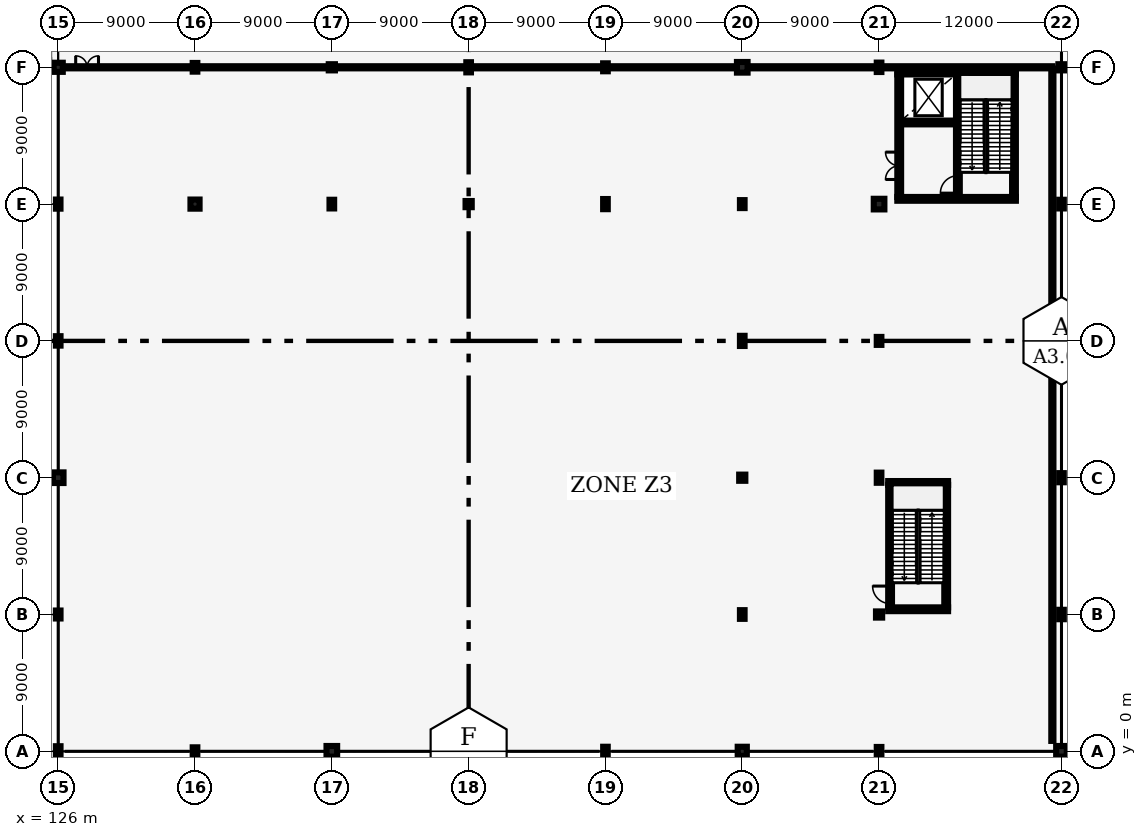
"""IFC4 building model, lengths in metres.
Left out: names, types, materials, properties, quantities, classifications, styles, units other than length and angle.
Written with IfcOpenShell. Run it as: python <this file> out.ifc"""

import sys

from ifc_helpers import new_model, si_unit, direction, frame, frame_2d, origin, origin_2d, place, context, subcontext, project, spatial, rectangle, hollow_circle, i_section, extrude, element, fill, save


model = new_model("IFC4")
c1 = context("Model", 3, precision=1e-05, world=origin(), true_north=direction((0.0, 1.0)))
c2 = subcontext(c1, "Body", "Model", "MODEL_VIEW")
j1 = project(units=[si_unit("LENGTHUNIT", "METRE"), si_unit("PLANEANGLEUNIT", "RADIAN")], contexts=[c1])
p1 = place(None, origin())
s1 = spatial("IfcSite", under=j1, at=p1, CompositionType="ELEMENT")
p2 = place(p1, origin())
s2 = spatial("IfcBuilding", under=s1, at=p2, CompositionType="ELEMENT")
p3 = place(p2, frame((0.0, 0.0, 12.0)))
s3 = spatial("IfcBuildingStorey", under=s2, at=p3, CompositionType="ELEMENT", Elevation=12.0)
p4 = place(p3, frame((126.0, 0.0, 0.0), z_axis=(0.0, 0.0, 1.0), x_axis=(1.0, 0.0, 0.0)))
e1 = element("IfcColumn", 1, at=p4, inside=s3, PredefinedType="COLUMN", context=c2, shape_type="SweptSolid", body=[
    extrude(i_section(OverallWidth=0.305, OverallDepth=0.668, WebThickness=0.021, FlangeThickness=0.04, FilletRadius=0.027, at=origin_2d()), origin(), (0.0, 0.0, 1.0), 6.0),
])
p5 = place(p3, frame((126.0, 9.0, 0.0), z_axis=(0.0, 0.0, 1.0), x_axis=(1.0, 0.0, 0.0)))
e2 = element("IfcColumn", 2, at=p5, inside=s3, PredefinedType="COLUMN", context=c2, shape_type="SweptSolid", body=[
    extrude(i_section(OverallWidth=0.306, OverallDepth=0.524, WebThickness=0.021, FlangeThickness=0.04, FilletRadius=0.027, at=origin_2d()), origin(), (0.0, 0.0, 1.0), 6.0),
])
p6 = place(p3, frame((126.0, 18.0, 0.0), z_axis=(0.0, 0.0, 1.0), x_axis=(1.0, 0.0, 0.0)))
e3 = element("IfcColumn", 3, at=p6, inside=s3, PredefinedType="COLUMN", context=c2, shape_type="SweptSolid", body=[
    extrude(rectangle(XDim=0.7, YDim=0.7, at=origin_2d()), origin(), (0.0, 0.0, 1.0), 6.0),
])
p7 = place(p3, frame((126.0, 27.0, 0.0), z_axis=(0.0, 0.0, 1.0), x_axis=(1.0, 0.0, 0.0)))
e4 = element("IfcColumn", 4, at=p7, inside=s3, PredefinedType="COLUMN", context=c2, shape_type="SweptSolid", body=[
    extrude(i_section(OverallWidth=0.305, OverallDepth=0.62, WebThickness=0.021, FlangeThickness=0.04, FilletRadius=0.027, at=origin_2d()), origin(), (0.0, 0.0, 1.0), 6.0),
])
p8 = place(p3, frame((126.0, 36.0, 0.0), z_axis=(0.0, 0.0, 1.0), x_axis=(1.0, 0.0, 0.0)))
e5 = element("IfcColumn", 5, at=p8, inside=s3, PredefinedType="COLUMN", context=c2, shape_type="SweptSolid", body=[
    extrude(i_section(OverallWidth=0.3, OverallDepth=0.6, WebThickness=0.015, FlangeThickness=0.03, FilletRadius=0.027, at=origin_2d()), origin(), (0.0, 0.0, 1.0), 6.0),
])
p9 = place(p3, frame((126.0, 45.0, 0.0), z_axis=(0.0, 0.0, 1.0), x_axis=(1.0, 0.0, 0.0)))
e6 = element("IfcColumn", 6, at=p9, inside=s3, PredefinedType="COLUMN", context=c2, shape_type="SweptSolid", body=[
    extrude(rectangle(XDim=0.6, YDim=0.6, at=origin_2d()), origin(), (0.0, 0.0, 1.0), 6.0),
])
p10 = place(p3, frame((135.0, 0.0, 0.0), z_axis=(0.0, 0.0, 1.0), x_axis=(1.0, 0.0, 0.0)))
e7 = element("IfcColumn", 7, at=p10, inside=s3, PredefinedType="COLUMN", context=c2, shape_type="SweptSolid", body=[
    extrude(i_section(OverallWidth=0.306, OverallDepth=0.524, WebThickness=0.021, FlangeThickness=0.04, FilletRadius=0.027, at=origin_2d()), origin(), (0.0, 0.0, 1.0), 6.0),
])
p11 = place(p3, frame((135.0, 36.0, 0.0), z_axis=(0.0, 0.0, 1.0), x_axis=(1.0, 0.0, 0.0)))
e8 = element("IfcColumn", 8, at=p11, inside=s3, PredefinedType="COLUMN", context=c2, shape_type="SweptSolid", body=[
    extrude(rectangle(XDim=0.6, YDim=0.6, at=origin_2d()), origin(), (0.0, 0.0, 1.0), 6.0),
])
p12 = place(p3, frame((135.0, 45.0, 0.0), z_axis=(0.0, 0.0, 1.0), x_axis=(1.0, 0.0, 0.0)))
e9 = element("IfcColumn", 9, at=p12, inside=s3, PredefinedType="COLUMN", context=c2, shape_type="SweptSolid", body=[
    extrude(i_section(OverallWidth=0.306, OverallDepth=0.572, WebThickness=0.021, FlangeThickness=0.04, FilletRadius=0.027, at=origin_2d()), origin(), (0.0, 0.0, 1.0), 6.0),
])
p13 = place(p3, frame((144.0, 0.0, 0.0), z_axis=(0.0, 0.0, 1.0), x_axis=(1.0, 0.0, 0.0)))
e10 = element("IfcColumn", 10, at=p13, inside=s3, PredefinedType="COLUMN", context=c2, shape_type="SweptSolid", body=[
    extrude(rectangle(XDim=0.7, YDim=0.7, at=origin_2d()), origin(), (0.0, 0.0, 1.0), 6.0),
])
p14 = place(p3, frame((144.0, 36.0, 0.0), z_axis=(0.0, 0.0, 1.0), x_axis=(1.0, 0.0, 0.0)))
e11 = element("IfcColumn", 11, at=p14, inside=s3, PredefinedType="COLUMN", context=c2, shape_type="SweptSolid", body=[
    extrude(i_section(OverallWidth=0.306, OverallDepth=0.572, WebThickness=0.021, FlangeThickness=0.04, FilletRadius=0.027, at=origin_2d()), origin(), (0.0, 0.0, 1.0), 6.0),
])
p15 = place(p3, frame((144.0, 45.0, 0.0), z_axis=(0.0, 0.0, 1.0), x_axis=(1.0, 0.0, 0.0)))
e12 = element("IfcColumn", 12, at=p15, inside=s3, PredefinedType="COLUMN", context=c2, shape_type="SweptSolid", body=[
    extrude(hollow_circle(Radius=0.203, WallThickness=0.016, at=origin_2d()), origin(), (0.0, 0.0, 1.0), 6.0),
])
p16 = place(p3, frame((153.0, 0.0, 0.0), z_axis=(0.0, 0.0, 1.0), x_axis=(1.0, 0.0, 0.0)))
e13 = element("IfcColumn", 13, at=p16, inside=s3, PredefinedType="COLUMN", context=c2, shape_type="SweptSolid", body=[
    extrude(i_section(OverallWidth=0.305, OverallDepth=0.62, WebThickness=0.021, FlangeThickness=0.04, FilletRadius=0.027, at=origin_2d()), origin(), (0.0, 0.0, 1.0), 6.0),
])
p17 = place(p3, frame((153.0, 36.0, 0.0), z_axis=(0.0, 0.0, 1.0), x_axis=(1.0, 0.0, 0.0)))
e14 = element("IfcColumn", 14, at=p17, inside=s3, PredefinedType="COLUMN", context=c2, shape_type="SweptSolid", body=[
    extrude(hollow_circle(Radius=0.203, WallThickness=0.016, at=origin_2d()), origin(), (0.0, 0.0, 1.0), 6.0),
])
p18 = place(p3, frame((153.0, 45.0, 0.0), z_axis=(0.0, 0.0, 1.0), x_axis=(1.0, 0.0, 0.0)))
e15 = element("IfcColumn", 15, at=p18, inside=s3, PredefinedType="COLUMN", context=c2, shape_type="SweptSolid", body=[
    extrude(i_section(OverallWidth=0.305, OverallDepth=0.668, WebThickness=0.021, FlangeThickness=0.04, FilletRadius=0.027, at=origin_2d()), origin(), (0.0, 0.0, 1.0), 6.0),
])
p19 = place(p3, frame((162.0, 0.0, 0.0), z_axis=(0.0, 0.0, 1.0), x_axis=(1.0, 0.0, 0.0)))
e16 = element("IfcColumn", 16, at=p19, inside=s3, PredefinedType="COLUMN", context=c2, shape_type="SweptSolid", body=[
    extrude(i_section(OverallWidth=0.3, OverallDepth=0.6, WebThickness=0.015, FlangeThickness=0.03, FilletRadius=0.027, at=origin_2d()), origin(), (0.0, 0.0, 1.0), 6.0),
])
p20 = place(p3, frame((162.0, 36.0, 0.0), z_axis=(0.0, 0.0, 1.0), x_axis=(1.0, 0.0, 0.0)))
e17 = element("IfcColumn", 17, at=p20, inside=s3, PredefinedType="COLUMN", context=c2, shape_type="SweptSolid", body=[
    extrude(i_section(OverallWidth=0.305, OverallDepth=0.668, WebThickness=0.021, FlangeThickness=0.04, FilletRadius=0.027, at=origin_2d()), origin(), (0.0, 0.0, 1.0), 6.0),
])
p21 = place(p3, frame((162.0, 45.0, 0.0), z_axis=(0.0, 0.0, 1.0), x_axis=(1.0, 0.0, 0.0)))
e18 = element("IfcColumn", 18, at=p21, inside=s3, PredefinedType="COLUMN", context=c2, shape_type="SweptSolid", body=[
    extrude(i_section(OverallWidth=0.306, OverallDepth=0.524, WebThickness=0.021, FlangeThickness=0.04, FilletRadius=0.027, at=origin_2d()), origin(), (0.0, 0.0, 1.0), 6.0),
])
p22 = place(p3, frame((171.0, 0.0, 0.0), z_axis=(0.0, 0.0, 1.0), x_axis=(1.0, 0.0, 0.0)))
e19 = element("IfcColumn", 19, at=p22, inside=s3, PredefinedType="COLUMN", context=c2, shape_type="SweptSolid", body=[
    extrude(rectangle(XDim=0.6, YDim=0.6, at=origin_2d()), origin(), (0.0, 0.0, 1.0), 6.0),
])
p23 = place(p3, frame((171.0, 9.0, 0.0), z_axis=(0.0, 0.0, 1.0), x_axis=(1.0, 0.0, 0.0)))
e20 = element("IfcColumn", 20, at=p23, inside=s3, PredefinedType="COLUMN", context=c2, shape_type="SweptSolid", body=[
    extrude(i_section(OverallWidth=0.306, OverallDepth=0.572, WebThickness=0.021, FlangeThickness=0.04, FilletRadius=0.027, at=origin_2d()), origin(), (0.0, 0.0, 1.0), 6.0),
])
p24 = place(p3, frame((171.0, 18.0, 0.0), z_axis=(0.0, 0.0, 1.0), x_axis=(1.0, 0.0, 0.0)))
e21 = element("IfcColumn", 21, at=p24, inside=s3, PredefinedType="COLUMN", context=c2, shape_type="SweptSolid", body=[
    extrude(hollow_circle(Radius=0.203, WallThickness=0.016, at=origin_2d()), origin(), (0.0, 0.0, 1.0), 6.0),
])
p25 = place(p3, frame((171.0, 27.0, 0.0), z_axis=(0.0, 0.0, 1.0), x_axis=(1.0, 0.0, 0.0)))
e22 = element("IfcColumn", 22, at=p25, inside=s3, PredefinedType="COLUMN", context=c2, shape_type="SweptSolid", body=[
    extrude(i_section(OverallWidth=0.305, OverallDepth=0.668, WebThickness=0.021, FlangeThickness=0.04, FilletRadius=0.027, at=origin_2d()), origin(), (0.0, 0.0, 1.0), 6.0),
])
p26 = place(p3, frame((171.0, 36.0, 0.0), z_axis=(0.0, 0.0, 1.0), x_axis=(1.0, 0.0, 0.0)))
e23 = element("IfcColumn", 23, at=p26, inside=s3, PredefinedType="COLUMN", context=c2, shape_type="SweptSolid", body=[
    extrude(i_section(OverallWidth=0.306, OverallDepth=0.524, WebThickness=0.021, FlangeThickness=0.04, FilletRadius=0.027, at=origin_2d()), origin(), (0.0, 0.0, 1.0), 6.0),
])
p27 = place(p3, frame((171.0, 45.0, 0.0), z_axis=(0.0, 0.0, 1.0), x_axis=(1.0, 0.0, 0.0)))
e24 = element("IfcColumn", 24, at=p27, inside=s3, PredefinedType="COLUMN", context=c2, shape_type="SweptSolid", body=[
    extrude(rectangle(XDim=0.7, YDim=0.7, at=origin_2d()), origin(), (0.0, 0.0, 1.0), 6.0),
])
p28 = place(p3, frame((180.0, 0.0, 0.0), z_axis=(0.0, 0.0, 1.0), x_axis=(1.0, 0.0, 0.0)))
e25 = element("IfcColumn", 25, at=p28, inside=s3, PredefinedType="COLUMN", context=c2, shape_type="SweptSolid", body=[
    extrude(i_section(OverallWidth=0.306, OverallDepth=0.572, WebThickness=0.021, FlangeThickness=0.04, FilletRadius=0.027, at=origin_2d()), origin(), (0.0, 0.0, 1.0), 6.0),
])
p29 = place(p3, frame((180.0, 9.0, 0.0), z_axis=(0.0, 0.0, 1.0), x_axis=(1.0, 0.0, 0.0)))
e26 = element("IfcColumn", 26, at=p29, inside=s3, PredefinedType="COLUMN", context=c2, shape_type="SweptSolid", body=[
    extrude(hollow_circle(Radius=0.203, WallThickness=0.016, at=origin_2d()), origin(), (0.0, 0.0, 1.0), 6.0),
])
p30 = place(p3, frame((180.0, 18.0, 0.0), z_axis=(0.0, 0.0, 1.0), x_axis=(1.0, 0.0, 0.0)))
e27 = element("IfcColumn", 27, at=p30, inside=s3, PredefinedType="COLUMN", context=c2, shape_type="SweptSolid", body=[
    extrude(i_section(OverallWidth=0.305, OverallDepth=0.668, WebThickness=0.021, FlangeThickness=0.04, FilletRadius=0.027, at=origin_2d()), origin(), (0.0, 0.0, 1.0), 6.0),
])
p31 = place(p3, frame((180.0, 27.0, 0.0), z_axis=(0.0, 0.0, 1.0), x_axis=(1.0, 0.0, 0.0)))
e28 = element("IfcColumn", 28, at=p31, inside=s3, PredefinedType="COLUMN", context=c2, shape_type="SweptSolid", body=[
    extrude(i_section(OverallWidth=0.306, OverallDepth=0.524, WebThickness=0.021, FlangeThickness=0.04, FilletRadius=0.027, at=origin_2d()), origin(), (0.0, 0.0, 1.0), 6.0),
])
p32 = place(p3, frame((180.0, 36.0, 0.0), z_axis=(0.0, 0.0, 1.0), x_axis=(1.0, 0.0, 0.0)))
e29 = element("IfcColumn", 29, at=p32, inside=s3, PredefinedType="COLUMN", context=c2, shape_type="SweptSolid", body=[
    extrude(rectangle(XDim=0.7, YDim=0.7, at=origin_2d()), origin(), (0.0, 0.0, 1.0), 6.0),
])
p33 = place(p3, frame((180.0, 45.0, 0.0), z_axis=(0.0, 0.0, 1.0), x_axis=(1.0, 0.0, 0.0)))
e30 = element("IfcColumn", 30, at=p33, inside=s3, PredefinedType="COLUMN", context=c2, shape_type="SweptSolid", body=[
    extrude(i_section(OverallWidth=0.305, OverallDepth=0.62, WebThickness=0.021, FlangeThickness=0.04, FilletRadius=0.027, at=origin_2d()), origin(), (0.0, 0.0, 1.0), 6.0),
])
p34 = place(p3, frame((192.0, 0.0, 0.0), z_axis=(0.0, 0.0, 1.0), x_axis=(1.0, 0.0, 0.0)))
e31 = element("IfcColumn", 31, at=p34, inside=s3, PredefinedType="COLUMN", context=c2, shape_type="SweptSolid", body=[
    extrude(rectangle(XDim=0.7, YDim=0.7, at=origin_2d()), origin(), (0.0, 0.0, 1.0), 6.0),
])
p35 = place(p3, frame((192.0, 9.0, 0.0), z_axis=(0.0, 0.0, 1.0), x_axis=(1.0, 0.0, 0.0)))
e32 = element("IfcColumn", 32, at=p35, inside=s3, PredefinedType="COLUMN", context=c2, shape_type="SweptSolid", body=[
    extrude(i_section(OverallWidth=0.305, OverallDepth=0.62, WebThickness=0.021, FlangeThickness=0.04, FilletRadius=0.027, at=origin_2d()), origin(), (0.0, 0.0, 1.0), 6.0),
])
p36 = place(p3, frame((192.0, 18.0, 0.0), z_axis=(0.0, 0.0, 1.0), x_axis=(1.0, 0.0, 0.0)))
e33 = element("IfcColumn", 33, at=p36, inside=s3, PredefinedType="COLUMN", context=c2, shape_type="SweptSolid", body=[
    extrude(i_section(OverallWidth=0.3, OverallDepth=0.6, WebThickness=0.015, FlangeThickness=0.03, FilletRadius=0.027, at=origin_2d()), origin(), (0.0, 0.0, 1.0), 6.0),
])
p37 = place(p3, frame((192.0, 27.0, 0.0), z_axis=(0.0, 0.0, 1.0), x_axis=(1.0, 0.0, 0.0)))
e34 = element("IfcColumn", 34, at=p37, inside=s3, PredefinedType="COLUMN", context=c2, shape_type="SweptSolid", body=[
    extrude(rectangle(XDim=0.6, YDim=0.6, at=origin_2d()), origin(), (0.0, 0.0, 1.0), 6.0),
])
p38 = place(p3, frame((192.0, 36.0, 0.0), z_axis=(0.0, 0.0, 1.0), x_axis=(1.0, 0.0, 0.0)))
e35 = element("IfcColumn", 35, at=p38, inside=s3, PredefinedType="COLUMN", context=c2, shape_type="SweptSolid", body=[
    extrude(i_section(OverallWidth=0.306, OverallDepth=0.572, WebThickness=0.021, FlangeThickness=0.04, FilletRadius=0.027, at=origin_2d()), origin(), (0.0, 0.0, 1.0), 6.0),
])
p39 = place(p3, frame((192.0, 45.0, 0.0), z_axis=(0.0, 0.0, 1.0), x_axis=(1.0, 0.0, 0.0)))
e36 = element("IfcColumn", 36, at=p39, inside=s3, PredefinedType="COLUMN", context=c2, shape_type="SweptSolid", body=[
    extrude(hollow_circle(Radius=0.203, WallThickness=0.016, at=origin_2d()), origin(), (0.0, 0.0, 1.0), 6.0),
])
p40 = place(p3, frame((181.325, 36.47, 0.0), z_axis=(0.0, 0.0, 1.0), x_axis=(0.0, 1.0, 0.0)))
e37 = element("IfcWall", 37, at=p40, inside=s3, PredefinedType="SHEAR", context=c2, shape_type="SweptSolid", body=[
    extrude(rectangle(XDim=8.06, YDim=0.25, at=frame_2d((4.03, 0.0))), origin(), (0.0, 0.0, 1.0), 5.61),
])
p41 = place(p40, frame((1.15, 0.0, 0.0)))
e38 = element("IfcOpeningElement", 38, at=p41, cuts=e37, PredefinedType="OPENING", context=c2, shape_type="SweptSolid", body=[
    extrude(rectangle(XDim=1.8, YDim=2.2, at=frame_2d((0.9, 1.1))), frame((0.0, 0.135, 0.0), z_axis=(0.0, -1.0, 0.0), x_axis=(1.0, 0.0, 0.0)), (0.0, 0.0, 1.0), 0.27),
])
p42 = place(p3, frame((188.875, 36.47, 0.0), z_axis=(0.0, 0.0, 1.0), x_axis=(0.0, 1.0, 0.0)))
e39 = element("IfcWall", 39, at=p42, inside=s3, PredefinedType="SHEAR", context=c2, shape_type="SweptSolid", body=[
    extrude(rectangle(XDim=8.06, YDim=0.25, at=frame_2d((4.03, 0.0))), origin(), (0.0, 0.0, 1.0), 5.61),
])
for number, where, z_axis, x_axis in (
    (40, (181.2, 36.345, 0.0), (0.0, 0.0, 1.0), (1.0, 0.0, 0.0)),
    (41, (181.2, 44.655, 0.0), (0.0, 0.0, 1.0), (1.0, 0.0, 0.0)),
):
    element("IfcWall", number, at=place(p3, frame(where, z_axis=z_axis, x_axis=x_axis)), inside=s3, PredefinedType="SHEAR", context=c2, shape_type="SweptSolid", body=[
        extrude(rectangle(XDim=7.8, YDim=0.25, at=frame_2d((3.9, 0.0))), origin(), (0.0, 0.0, 1.0), 5.61),
    ])
p43 = place(p3, frame((185.185, 36.47, 0.0), z_axis=(0.0, 0.0, 1.0), x_axis=(0.0, 1.0, 0.0)))
e42 = element("IfcWall", 42, at=p43, inside=s3, PredefinedType="SHEAR", context=c2, shape_type="SweptSolid", body=[
    extrude(rectangle(XDim=8.06, YDim=0.25, at=frame_2d((4.03, 0.0))), origin(), (0.0, 0.0, 1.0), 5.61),
])
p44 = place(p43, frame((0.25, 0.0, 0.0)))
e43 = element("IfcOpeningElement", 43, at=p44, cuts=e42, PredefinedType="OPENING", context=c2, shape_type="SweptSolid", body=[
    extrude(rectangle(XDim=1.15, YDim=2.15, at=frame_2d((0.575, 1.075))), frame((0.0, 0.135, 0.0), z_axis=(0.0, -1.0, 0.0), x_axis=(1.0, 0.0, 0.0)), (0.0, 0.0, 1.0), 0.27),
])
p45 = place(p3, frame((181.45, 41.37, 0.0), z_axis=(0.0, 0.0, 1.0), x_axis=(1.0, 0.0, 0.0)))
e44 = element("IfcWall", 44, at=p45, inside=s3, PredefinedType="SHEAR", context=c2, shape_type="SweptSolid", body=[
    extrude(rectangle(XDim=3.61, YDim=0.25, at=frame_2d((1.805, 0.0))), origin(), (0.0, 0.0, 1.0), 5.61),
])
p46 = place(p45, frame((0.95, 0.0, 0.0)))
e45 = element("IfcOpeningElement", 45, at=p46, cuts=e44, PredefinedType="OPENING", context=c2, shape_type="SweptSolid", body=[
    extrude(rectangle(XDim=1.2, YDim=2.2, at=frame_2d((0.6, 1.1))), frame((0.0, 0.135, 0.0), z_axis=(0.0, -1.0, 0.0), x_axis=(1.0, 0.0, 0.0)), (0.0, 0.0, 1.0), 0.27),
])
p47 = place(p3, frame((180.725, 9.47, 0.0), z_axis=(0.0, 0.0, 1.0), x_axis=(0.0, 1.0, 0.0)))
e46 = element("IfcWall", 46, at=p47, inside=s3, PredefinedType="SHEAR", context=c2, shape_type="SweptSolid", body=[
    extrude(rectangle(XDim=8.06, YDim=0.25, at=frame_2d((4.03, 0.0))), origin(), (0.0, 0.0, 1.0), 5.61),
])
p48 = place(p47, frame((0.25, 0.0, 0.0)))
e47 = element("IfcOpeningElement", 47, at=p48, cuts=e46, PredefinedType="OPENING", context=c2, shape_type="SweptSolid", body=[
    extrude(rectangle(XDim=1.15, YDim=2.15, at=frame_2d((0.575, 1.075))), frame((0.0, 0.135, 0.0), z_axis=(0.0, -1.0, 0.0), x_axis=(1.0, 0.0, 0.0)), (0.0, 0.0, 1.0), 0.27),
])
p49 = place(p3, frame((184.415, 9.47, 0.0), z_axis=(0.0, 0.0, 1.0), x_axis=(0.0, 1.0, 0.0)))
e48 = element("IfcWall", 48, at=p49, inside=s3, PredefinedType="SHEAR", context=c2, shape_type="SweptSolid", body=[
    extrude(rectangle(XDim=8.06, YDim=0.25, at=frame_2d((4.03, 0.0))), origin(), (0.0, 0.0, 1.0), 5.61),
])
for number, where, z_axis, x_axis in (
    (49, (180.6, 9.345, 0.0), (0.0, 0.0, 1.0), (1.0, 0.0, 0.0)),
    (50, (180.6, 17.655, 0.0), (0.0, 0.0, 1.0), (1.0, 0.0, 0.0)),
):
    element("IfcWall", number, at=place(p3, frame(where, z_axis=z_axis, x_axis=x_axis)), inside=s3, PredefinedType="SHEAR", context=c2, shape_type="SweptSolid", body=[
        extrude(rectangle(XDim=3.94, YDim=0.25, at=frame_2d((1.97, 0.0))), origin(), (0.0, 0.0, 1.0), 5.61),
    ])
p50 = place(p3, frame((126.6, 45.0, 0.0), z_axis=(0.0, 0.0, 1.0), x_axis=(1.0, 0.0, 0.0)))
e51 = element("IfcWall", 51, at=p50, inside=s3, PredefinedType="PARTITIONING", context=c2, shape_type="SweptSolid", body=[
    extrude(rectangle(XDim=64.8, YDim=0.14, at=frame_2d((32.4, 0.0))), origin(), (0.0, 0.0, 1.0), 4.75),
])
p51 = place(p50, frame((0.55, 0.0, 0.0)))
e52 = element("IfcOpeningElement", 52, at=p51, cuts=e51, PredefinedType="OPENING", context=c2, shape_type="SweptSolid", body=[
    extrude(rectangle(XDim=1.5, YDim=2.25, at=frame_2d((0.75, 1.125))), frame((0.0, 0.08, 0.0), z_axis=(0.0, -1.0, 0.0), x_axis=(1.0, 0.0, 0.0)), (0.0, 0.0, 1.0), 0.16),
])
p52 = place(p3, frame((191.4, 0.684, 0.0), z_axis=(0.0, 0.0, 1.0), x_axis=(0.0, 1.0, 0.0)))
e53 = element("IfcWall", 53, at=p52, inside=s3, PredefinedType="PARTITIONING", context=c2, shape_type="SweptSolid", body=[
    extrude(rectangle(XDim=44.232, YDim=0.14, at=frame_2d((22.116, 0.0))), origin(), (0.0, 0.0, 1.0), 4.75),
])
p53 = place(p44, origin())
e54 = element("IfcDoor", 54, at=p53, inside=s3, OperationType="SINGLE_SWING_LEFT", PredefinedType="DOOR", context=c2, shape_type="SweptSolid", body=[
    extrude(rectangle(XDim=1.15, YDim=2.15, at=frame_2d((0.575, 1.075))), frame((0.0, 0.025, 0.0), z_axis=(0.0, -1.0, 0.0), x_axis=(1.0, 0.0, 0.0)), (0.0, 0.0, 1.0), 0.05),
])
fill(e43, e54)
p54 = place(p46, origin())
e55 = element("IfcDoor", 55, at=p54, inside=s3, OperationType="DOUBLE_DOOR_SLIDING", PredefinedType="DOOR", context=c2, shape_type="SweptSolid", body=[
    extrude(rectangle(XDim=1.2, YDim=2.2, at=frame_2d((0.6, 1.1))), frame((0.0, 0.025, 0.0), z_axis=(0.0, -1.0, 0.0), x_axis=(1.0, 0.0, 0.0)), (0.0, 0.0, 1.0), 0.05),
])
fill(e45, e55)
p55 = place(p41, origin())
e56 = element("IfcDoor", 56, at=p55, inside=s3, OperationType="DOUBLE_DOOR_SINGLE_SWING", PredefinedType="DOOR", context=c2, shape_type="SweptSolid", body=[
    extrude(rectangle(XDim=1.8, YDim=2.2, at=frame_2d((0.9, 1.1))), frame((0.0, 0.025, 0.0), z_axis=(0.0, -1.0, 0.0), x_axis=(1.0, 0.0, 0.0)), (0.0, 0.0, 1.0), 0.05),
])
fill(e38, e56)
p56 = place(p48, origin())
e57 = element("IfcDoor", 57, at=p56, inside=s3, OperationType="SINGLE_SWING_RIGHT", PredefinedType="DOOR", context=c2, shape_type="SweptSolid", body=[
    extrude(rectangle(XDim=1.15, YDim=2.15, at=frame_2d((0.575, 1.075))), frame((0.0, 0.025, 0.0), z_axis=(0.0, -1.0, 0.0), x_axis=(1.0, 0.0, 0.0)), (0.0, 0.0, 1.0), 0.05),
])
fill(e47, e57)
p57 = place(p51, origin())
e58 = element("IfcDoor", 58, at=p57, inside=s3, OperationType="DOUBLE_DOOR_SINGLE_SWING", PredefinedType="DOOR", context=c2, shape_type="SweptSolid", body=[
    extrude(rectangle(XDim=1.5, YDim=2.25, at=frame_2d((0.75, 1.125))), frame((0.0, 0.025, 0.0), z_axis=(0.0, -1.0, 0.0), x_axis=(1.0, 0.0, 0.0)), (0.0, 0.0, 1.0), 0.05),
])
fill(e52, e58)
save(model, sys.argv[1])
